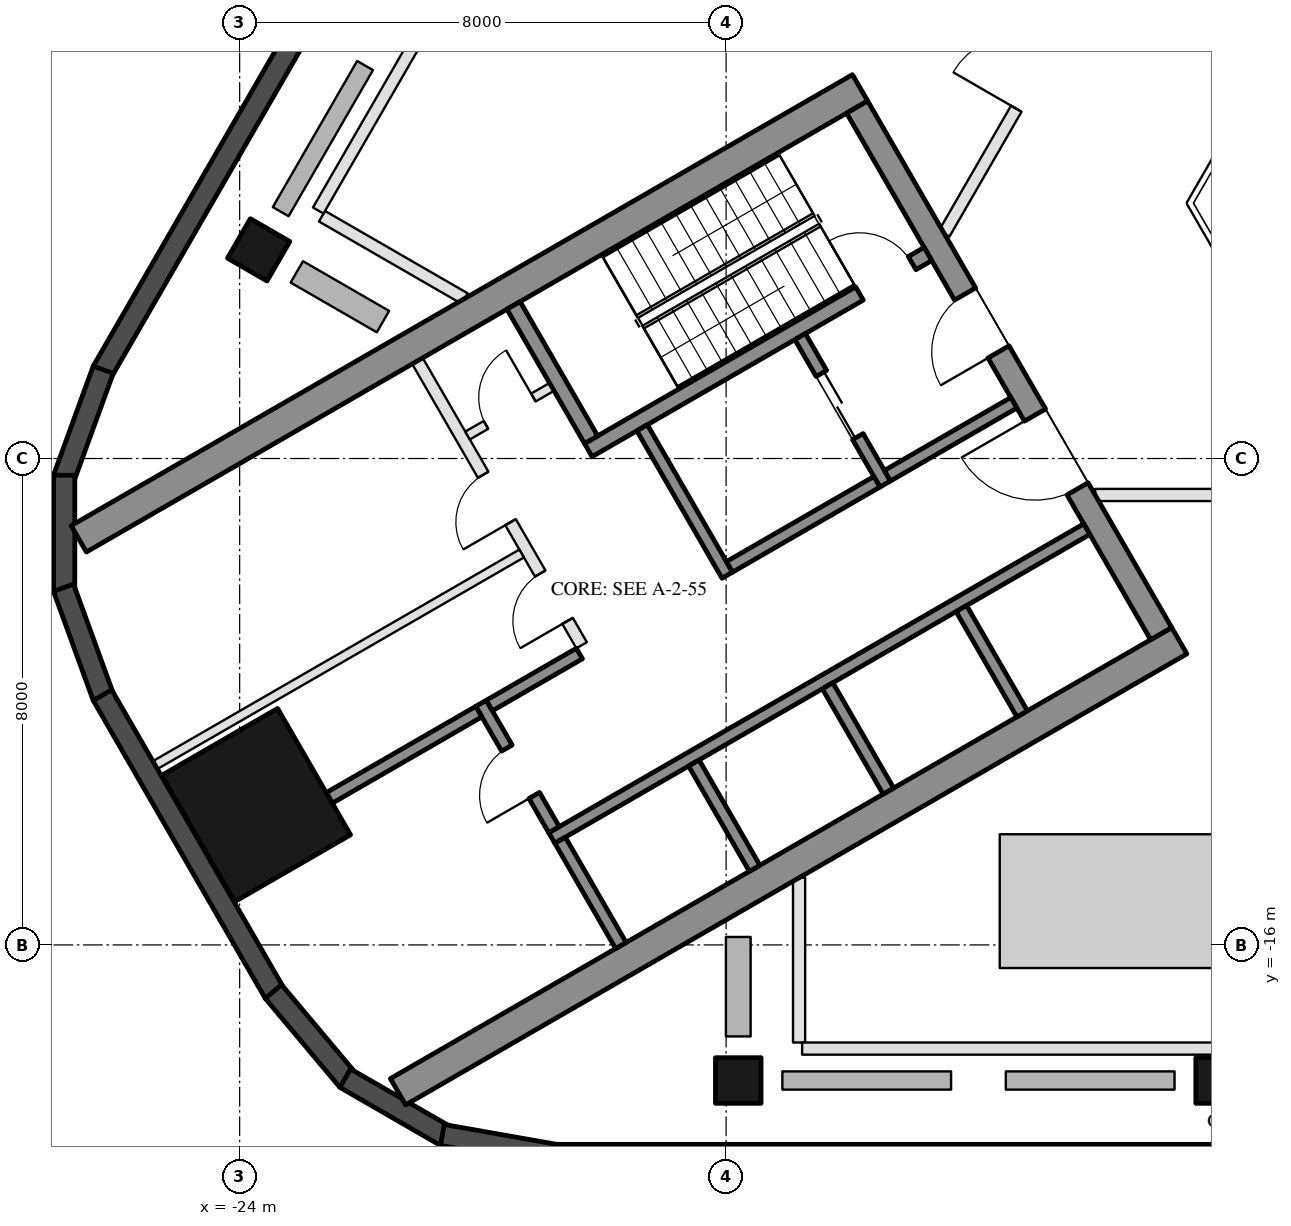
"""IFC4 building model, lengths in metres.
Left out: names, types, materials, properties, quantities, classifications, styles, units other than length and angle.
Written with IfcOpenShell. Run it as: python <this file> out.ifc"""

import sys

from ifc_helpers import new_model, si_unit, direction, frame, frame_2d, origin, origin_2d, place, context, subcontext, project, spatial, rectangle, hollow_rectangle, extrude, element, fill, save


model = new_model("IFC4")
c1 = context("Model", 3, precision=1e-05, world=origin(), true_north=direction((0.0, 1.0)))
c2 = subcontext(c1, "Body", "Model", "MODEL_VIEW")
j1 = project(units=[si_unit("LENGTHUNIT", "METRE"), si_unit("PLANEANGLEUNIT", "RADIAN")], contexts=[c1])
p1 = place(None, origin())
s1 = spatial("IfcSite", under=j1, at=p1, CompositionType="ELEMENT")
p2 = place(p1, origin())
s2 = spatial("IfcBuilding", under=s1, at=p2, CompositionType="ELEMENT")
p3 = place(p2, frame((0.0, 0.0, 237.7)))
s3 = spatial("IfcBuildingStorey", under=s2, at=p3, CompositionType="ELEMENT", Elevation=237.7)
for number, where, z_axis, x_axis in (
    (1, (-15.8, -18.23, 0.0), (0.0, 0.0, 1.0), (-1.0, 0.0, 0.0)),
    (2, (-7.9, -18.23, 0.0), (0.0, 0.0, 1.0), (-1.0, 0.0, 0.0)),
    (3, (-23.688, -4.568, 0.0), (0.0, 0.0, 1.0), (0.5, 0.866, 0.0)),
):
    element("IfcColumn", number, at=place(p3, frame(where, z_axis=z_axis, x_axis=x_axis)), inside=s3, PredefinedType="COLUMN", context=c2, shape_type="SweptSolid", body=[
        extrude(hollow_rectangle(XDim=0.75, YDim=0.75, WallThickness=0.035, at=origin_2d()), origin(), (0.0, 0.0, 1.0), 4.5),
    ])
p4 = place(p3, frame((-23.729, -13.7, 0.0), z_axis=(0.0, 0.0, 1.0), x_axis=(-0.5, 0.866025403784, 0.0)))
e4 = element("IfcColumn", 4, at=p4, inside=s3, PredefinedType="COLUMN", context=c2, shape_type="SweptSolid", body=[
    extrude(hollow_rectangle(XDim=2.4, YDim=2.2, WallThickness=0.06, at=origin_2d()), origin(), (0.0, 0.0, 1.0), 4.5),
])
p5 = place(p3, frame((-7.441, 26.022, 0.0), z_axis=(0.0, 0.0, 1.0), x_axis=(-0.499998380999, -0.866026338513, 0.0)))
e5 = element("IfcWall", 5, at=p5, inside=s3, PredefinedType="SOLIDWALL", context=c2, shape_type="SweptSolid", body=[
    extrude(rectangle(XDim=37.631, YDim=0.35, at=frame_2d((18.816, 0.0))), origin(), (0.0, 0.0, 1.0), 4.2),
])
for number, where, z_axis, x_axis in (
    (6, (-26.244, -6.54, 0.0), (0.0, 0.0, 1.0), (-0.342, -0.94, 0.0)),
    (7, (-26.886, -8.275, 0.0), (0.0, 0.0, 1.0), (0.0, -1.0, 0.0)),
    (8, (-26.897, -10.125, 0.0), (0.0, 0.0, 1.0), (0.342, -0.94, 0.0)),
):
    element("IfcWall", number, at=place(p3, frame(where, z_axis=z_axis, x_axis=x_axis)), inside=s3, PredefinedType="SOLIDWALL", context=c2, shape_type="SweptSolid", body=[
        extrude(rectangle(XDim=1.91, YDim=0.35, at=frame_2d((0.955, 0.0))), origin(), (0.0, 0.0, 1.0), 4.2),
    ])
p6 = place(p3, frame((-26.256, -11.893, 0.0), z_axis=(0.0, 0.0, 1.0), x_axis=(0.499986410639, -0.866033249463, 0.0)))
e9 = element("IfcWall", 9, at=p6, inside=s3, PredefinedType="SOLIDWALL", context=c2, shape_type="SweptSolid", body=[
    extrude(rectangle(XDim=5.658, YDim=0.35, at=frame_2d((2.829, 0.0))), origin(), (0.0, 0.0, 1.0), 4.2),
])
for number, where, z_axis, x_axis in (
    (10, (-23.445, -16.768, 0.0), (0.0, 0.0, 1.0), (0.643, -0.766, 0.0)),
    (11, (-22.264, -18.192, 0.0), (0.0, 0.0, 1.0), (0.866, -0.5, 0.0)),
):
    element("IfcWall", number, at=place(p3, frame(where, z_axis=z_axis, x_axis=x_axis)), inside=s3, PredefinedType="SOLIDWALL", context=c2, shape_type="SweptSolid", body=[
        extrude(rectangle(XDim=1.91, YDim=0.35, at=frame_2d((0.955, 0.0))), origin(), (0.0, 0.0, 1.0), 4.2),
    ])
p7 = place(p3, frame((-20.667, -19.126, 0.0), z_axis=(0.0, 0.0, 1.0), x_axis=(0.984798995425, -0.173697837091, 0.0)))
e12 = element("IfcWall", 12, at=p7, inside=s3, PredefinedType="SOLIDWALL", context=c2, shape_type="SweptSolid", body=[
    extrude(rectangle(XDim=1.91, YDim=0.35, at=frame_2d((0.955, 0.0))), origin(), (0.0, 0.0, 1.0), 4.2),
])
p8 = place(p3, frame((-18.816, -19.455, 0.0), z_axis=(0.0, 0.0, 1.0), x_axis=(1.0, 0.0, 0.0)))
e13 = element("IfcWall", 13, at=p8, inside=s3, PredefinedType="SOLIDWALL", context=c2, shape_type="SweptSolid", body=[
    extrude(rectangle(XDim=37.632, YDim=0.35, at=frame_2d((18.816, 0.0))), origin(), (0.0, 0.0, 1.0), 4.2),
])
for number, where, z_axis, x_axis in (
    (14, (-13.797, -1.903, 0.0), (0.0, 0.0, 1.0), (-0.866, -0.5, 0.0)),
    (15, (-8.547, -10.997, 0.0), (0.0, 0.0, 1.0), (-0.866, -0.5, 0.0)),
):
    element("IfcWall", number, at=place(p3, frame(where, z_axis=z_axis, x_axis=x_axis)), inside=s3, PredefinedType="SHEAR", context=c2, shape_type="SweptSolid", body=[
        extrude(rectangle(XDim=14.837, YDim=0.5, at=frame_2d((7.418, 0.0))), origin(), (0.0, 0.0, 1.0), 4.2),
    ])
p9 = place(p3, frame((-13.845, -2.22, 0.0), z_axis=(0.0, 0.0, 1.0), x_axis=(0.500004234368, -0.866022959057, 0.0)))
e16 = element("IfcWall", 16, at=p9, inside=s3, PredefinedType="SHEAR", context=c2, shape_type="SweptSolid", body=[
    extrude(rectangle(XDim=10.0, YDim=0.4, at=frame_2d((5.0, 0.0))), origin(), (0.0, 0.0, 1.0), 4.2),
])
p10 = place(p9, frame((3.55, 0.0, 0.0)))
e17 = element("IfcOpeningElement", 17, at=p10, cuts=e16, PredefinedType="OPENING", context=c2, shape_type="SweptSolid", body=[
    extrude(rectangle(XDim=1.1, YDim=2.1, at=frame_2d((0.55, 1.05))), frame((0.0, 0.21, 0.0), z_axis=(0.0, -1.0, 0.0), x_axis=(1.0, 0.0, 0.0)), (0.0, 0.0, 1.0), 0.42),
])
p11 = place(p9, frame((5.85, 0.0, 0.0)))
e18 = element("IfcOpeningElement", 18, at=p11, cuts=e16, PredefinedType="OPENING", context=c2, shape_type="SweptSolid", body=[
    extrude(rectangle(XDim=1.4, YDim=2.1, at=frame_2d((0.7, 1.05))), frame((0.0, 0.21, 0.0), z_axis=(0.0, -1.0, 0.0), x_axis=(1.0, 0.0, 0.0)), (0.0, 0.0, 1.0), 0.42),
])
p12 = place(p3, frame((-12.681, -4.636, 0.0), z_axis=(0.0, 0.0, 1.0), x_axis=(-0.866021702275, -0.500006411147, 0.0)))
e19 = element("IfcWall", 19, at=p12, inside=s3, PredefinedType="SHEAR", context=c2, shape_type="SweptSolid", body=[
    extrude(rectangle(XDim=6.45, YDim=0.25, at=frame_2d((3.225, 0.0))), origin(), (0.0, 0.0, 1.0), 4.2),
])
p13 = place(p12, frame((0.3, 0.0, 0.0)))
e20 = element("IfcOpeningElement", 20, at=p13, cuts=e19, PredefinedType="OPENING", context=c2, shape_type="SweptSolid", body=[
    extrude(rectangle(XDim=1.0, YDim=2.1, at=frame_2d((0.5, 1.05))), frame((0.0, 0.135, 0.0), z_axis=(0.0, -1.0, 0.0), x_axis=(1.0, 0.0, 0.0)), (0.0, 0.0, 1.0), 0.27),
])
p14 = place(p3, frame((-19.496, -5.482, 0.0), z_axis=(0.0, 0.0, 1.0), x_axis=(0.499990435942, -0.866030925526, 0.0)))
e21 = element("IfcWall", 21, at=p14, inside=s3, PredefinedType="SHEAR", context=c2, shape_type="SweptSolid", body=[
    extrude(rectangle(XDim=2.55, YDim=0.25, at=frame_2d((1.275, 0.0))), origin(), (0.0, 0.0, 1.0), 4.2),
])
p15 = place(p3, frame((-17.381, -7.495, 0.0), z_axis=(0.0, 0.0, 1.0), x_axis=(0.500011755427, -0.866018616679, 0.0)))
e22 = element("IfcWall", 22, at=p15, inside=s3, PredefinedType="SHEAR", context=c2, shape_type="SweptSolid", body=[
    extrude(rectangle(XDim=2.8, YDim=0.2, at=frame_2d((1.4, 0.0))), origin(), (0.0, 0.0, 1.0), 4.2),
])
p16 = place(p3, frame((-14.783, -5.995, 0.0), z_axis=(0.0, 0.0, 1.0), x_axis=(0.49994636267, -0.866056369097, 0.0)))
e23 = element("IfcWall", 23, at=p16, inside=s3, PredefinedType="SHEAR", context=c2, shape_type="SweptSolid", body=[
    extrude(rectangle(XDim=2.8, YDim=0.2, at=frame_2d((1.4, 0.0))), origin(), (0.0, 0.0, 1.0), 4.2),
])
p17 = place(p16, frame((0.7, 0.0, 0.0)))
e24 = element("IfcOpeningElement", 24, at=p17, cuts=e23, PredefinedType="OPENING", context=c2, shape_type="SweptSolid", body=[
    extrude(rectangle(XDim=1.2, YDim=2.1, at=frame_2d((0.6, 1.05))), frame((0.0, 0.11, 0.0), z_axis=(0.0, -1.0, 0.0), x_axis=(1.0, 0.0, 0.0)), (0.0, 0.0, 1.0), 0.22),
])
p18 = place(p3, frame((-13.52, -8.383, 0.0), z_axis=(0.0, 0.0, 1.0), x_axis=(-0.866034573852, -0.49998411664, 0.0)))
e25 = element("IfcWall", 25, at=p18, inside=s3, PredefinedType="SHEAR", context=c2, shape_type="SweptSolid", body=[
    extrude(rectangle(XDim=2.8, YDim=0.2, at=frame_2d((1.4, 0.0))), origin(), (0.0, 0.0, 1.0), 4.2),
])
p19 = place(p3, frame((-11.268, -7.083, 0.0), z_axis=(0.0, 0.0, 1.0), x_axis=(-0.866050077142, -0.499957262057, 0.0)))
e26 = element("IfcWall", 26, at=p19, inside=s3, PredefinedType="SHEAR", context=c2, shape_type="SweptSolid", body=[
    extrude(rectangle(XDim=2.4, YDim=0.2, at=frame_2d((1.2, 0.0))), origin(), (0.0, 0.0, 1.0), 4.2),
])
p20 = place(p3, frame((-10.068, -9.162, 0.0), z_axis=(0.0, 0.0, 1.0), x_axis=(-0.866032725843, -0.499987317609, 0.0)))
e27 = element("IfcWall", 27, at=p20, inside=s3, PredefinedType="SHEAR", context=c2, shape_type="SweptSolid", body=[
    extrude(rectangle(XDim=10.16, YDim=0.2, at=frame_2d((5.08, 0.0))), origin(), (0.0, 0.0, 1.0), 4.2),
])
p21 = place(p3, frame((-20.031, -12.026, 0.0), z_axis=(0.0, 0.0, 1.0), x_axis=(0.500033551112, -0.866006032174, 0.0)))
e28 = element("IfcWall", 28, at=p21, inside=s3, PredefinedType="SHEAR", context=c2, shape_type="SweptSolid", body=[
    extrude(rectangle(XDim=2.4, YDim=0.2, at=frame_2d((1.2, 0.0))), origin(), (0.0, 0.0, 1.0), 4.2),
])
p22 = place(p21, frame((0.85, 0.0, 0.0)))
e29 = element("IfcOpeningElement", 29, at=p22, cuts=e28, PredefinedType="OPENING", context=c2, shape_type="SweptSolid", body=[
    extrude(rectangle(XDim=0.9, YDim=2.1, at=frame_2d((0.45, 1.05))), frame((0.0, 0.11, 0.0), z_axis=(0.0, -1.0, 0.0), x_axis=(1.0, 0.0, 0.0)), (0.0, 0.0, 1.0), 0.22),
])
p23 = place(p3, frame((-18.413, -11.208, 0.0), z_axis=(0.0, 0.0, 1.0), x_axis=(-0.866038183914, -0.499977863513, 0.0)))
e30 = element("IfcWall", 30, at=p23, inside=s3, PredefinedType="SHEAR", context=c2, shape_type="SweptSolid", body=[
    extrude(rectangle(XDim=1.71, YDim=0.2, at=frame_2d((0.855, 0.0))), origin(), (0.0, 0.0, 1.0), 4.2),
])
for number, where, z_axis, x_axis in (
    (31, (-12.131, -10.468, 0.0), (0.0, 0.0, 1.0), (0.5, -0.866, 0.0)),
    (32, (-14.331, -11.738, 0.0), (0.0, 0.0, 1.0), (0.5, -0.866, 0.0)),
    (33, (-16.531, -13.008, 0.0), (0.0, 0.0, 1.0), (0.5, -0.866, 0.0)),
    (34, (-18.73, -14.278, 0.0), (0.0, 0.0, 1.0), (0.5, -0.866, 0.0)),
):
    element("IfcWall", number, at=place(p3, frame(where, z_axis=z_axis, x_axis=x_axis)), inside=s3, PredefinedType="SHEAR", context=c2, shape_type="SweptSolid", body=[
        extrude(rectangle(XDim=2.0, YDim=0.2, at=frame_2d((1.0, 0.0))), origin(), (0.0, 0.0, 1.0), 4.2),
    ])
p24 = place(p3, frame((-20.067, -12.163, 0.0), z_axis=(0.0, 0.0, 1.0), x_axis=(-0.866055327414, -0.49994816717, 0.0)))
e35 = element("IfcWall", 35, at=p24, inside=s3, PredefinedType="SHEAR", context=c2, shape_type="SweptSolid", body=[
    extrude(rectangle(XDim=2.84, YDim=0.2, at=frame_2d((1.42, 0.0))), origin(), (0.0, 0.0, 1.0), 4.2),
])
p25 = place(p3, frame((-21.076, -6.395, 0.0), z_axis=(0.0, 0.0, 1.0), x_axis=(0.50001468107, -0.866016927499, 0.0)))
e36 = element("IfcWall", 36, at=p25, inside=s3, PredefinedType="PARTITIONING", context=c2, shape_type="SweptSolid", body=[
    extrude(rectangle(XDim=5.4, YDim=0.2, at=frame_2d((2.7, 0.0))), origin(), (0.0, 0.0, 1.0), 4.2),
])
p26 = place(p25, frame((2.163, 0.0, 0.0)))
e37 = element("IfcOpeningElement", 37, at=p26, cuts=e36, PredefinedType="OPENING", context=c2, shape_type="SweptSolid", body=[
    extrude(rectangle(XDim=0.9, YDim=2.1, at=frame_2d((0.45, 1.05))), frame((0.0, 0.11, 0.0), z_axis=(0.0, -1.0, 0.0), x_axis=(1.0, 0.0, 0.0)), (0.0, 0.0, 1.0), 0.22),
])
p27 = place(p25, frame((4.038, 0.0, 0.0)))
e38 = element("IfcOpeningElement", 38, at=p27, cuts=e36, PredefinedType="OPENING", context=c2, shape_type="SweptSolid", body=[
    extrude(rectangle(XDim=0.9, YDim=2.1, at=frame_2d((0.45, 1.05))), frame((0.0, 0.11, 0.0), z_axis=(0.0, -1.0, 0.0), x_axis=(1.0, 0.0, 0.0)), (0.0, 0.0, 1.0), 0.22),
])
p28 = place(p3, frame((-18.866, -6.822, 0.0), z_axis=(0.0, 0.0, 1.0), x_axis=(-0.866028054938, -0.499995408039, 0.0)))
e39 = element("IfcWall", 39, at=p28, inside=s3, PredefinedType="PARTITIONING", context=c2, shape_type="SweptSolid", body=[
    extrude(rectangle(XDim=1.6, YDim=0.15, at=frame_2d((0.8, 0.0))), origin(), (0.0, 0.0, 1.0), 4.2),
])
p29 = place(p28, frame((0.35, 0.0, 0.0)))
e40 = element("IfcOpeningElement", 40, at=p29, cuts=e39, PredefinedType="OPENING", context=c2, shape_type="SweptSolid", body=[
    extrude(rectangle(XDim=0.9, YDim=2.1, at=frame_2d((0.45, 1.05))), frame((0.0, 0.085, 0.0), z_axis=(0.0, -1.0, 0.0), x_axis=(1.0, 0.0, 0.0)), (0.0, 0.0, 1.0), 0.17),
])
p30 = place(p3, frame((-19.363, -9.562, 0.0), z_axis=(0.0, 0.0, 1.0), x_axis=(-0.866016523273, -0.500015381182, 0.0)))
e41 = element("IfcWall", 41, at=p30, inside=s3, PredefinedType="PARTITIONING", context=c2, shape_type="SweptSolid", body=[
    extrude(rectangle(XDim=6.95, YDim=0.15, at=frame_2d((3.475, 0.0))), origin(), (0.0, 0.0, 1.0), 4.2),
])
p31 = place(p3, frame((-14.8, -17.605, 0.0), z_axis=(0.0, 0.0, 1.0), x_axis=(0.0, 1.0, 0.0)))
e42 = element("IfcWall", 42, at=p31, inside=s3, PredefinedType="PARTITIONING", context=c2, shape_type="SweptSolid", body=[
    extrude(rectangle(XDim=2.709, YDim=0.2, at=frame_2d((1.355, 0.0))), origin(), (0.0, 0.0, 1.0), 4.2),
])
p32 = place(p3, frame((-14.75, -17.705, 0.0), z_axis=(0.0, 0.0, 1.0), x_axis=(1.0, 0.0, 0.0)))
e43 = element("IfcWall", 43, at=p32, inside=s3, PredefinedType="PARTITIONING", context=c2, shape_type="SweptSolid", body=[
    extrude(rectangle(XDim=29.5, YDim=0.2, at=frame_2d((14.75, 0.0))), origin(), (0.0, 0.0, 1.0), 3.41),
])
p33 = place(p3, frame((-9.93, -8.6, 0.0), z_axis=(0.0, 0.0, 1.0), x_axis=(1.0, 0.0, 0.0)))
e44 = element("IfcWall", 44, at=p33, inside=s3, PredefinedType="PARTITIONING", context=c2, shape_type="SweptSolid", body=[
    extrude(rectangle(XDim=19.861, YDim=0.2, at=frame_2d((9.93, 0.0))), origin(), (0.0, 0.0, 1.0), 3.41),
])
p34 = place(p33, frame((6.121, 0.0, 0.0)))
e45 = element("IfcOpeningElement", 45, at=p34, cuts=e44, PredefinedType="OPENING", context=c2, shape_type="SweptSolid", body=[
    extrude(rectangle(XDim=1.2, YDim=2.1, at=frame_2d((0.6, 1.05))), frame((0.0, 0.11, 0.0), z_axis=(0.0, -1.0, 0.0), x_axis=(1.0, 0.0, 0.0)), (0.0, 0.0, 1.0), 0.22),
])
p35 = place(p33, frame((16.04, 0.0, 0.0)))
e46 = element("IfcOpeningElement", 46, at=p35, cuts=e44, PredefinedType="OPENING", context=c2, shape_type="SweptSolid", body=[
    extrude(rectangle(XDim=1.2, YDim=2.1, at=frame_2d((0.6, 1.05))), frame((0.0, 0.11, 0.0), z_axis=(0.0, -1.0, 0.0), x_axis=(1.0, 0.0, 0.0)), (0.0, 0.0, 1.0), 0.22),
])
p36 = place(p3, frame((-22.646, -4.015, 0.0), z_axis=(0.0, 0.0, 1.0), x_axis=(0.866044551023, -0.499966834543, 0.0)))
e47 = element("IfcWall", 47, at=p36, inside=s3, PredefinedType="PARTITIONING", context=c2, shape_type="SweptSolid", body=[
    extrude(rectangle(XDim=2.71, YDim=0.2, at=frame_2d((1.355, 0.0))), origin(), (0.0, 0.0, 1.0), 4.2),
])
p37 = place(p3, frame((-7.958, 21.626, 0.0), z_axis=(0.0, 0.0, 1.0), x_axis=(-0.499998500593, -0.866026269466, 0.0)))
e48 = element("IfcWall", 48, at=p37, inside=s3, PredefinedType="PARTITIONING", context=c2, shape_type="SweptSolid", body=[
    extrude(rectangle(XDim=29.5, YDim=0.2, at=frame_2d((14.75, 0.0))), origin(), (0.0, 0.0, 1.0), 3.41),
])
p38 = place(p3, frame((-2.482, 12.9, 0.0), z_axis=(0.0, 0.0, 1.0), x_axis=(-0.50000478328, -0.866022642139, 0.0)))
e49 = element("IfcWall", 49, at=p38, inside=s3, PredefinedType="PARTITIONING", context=c2, shape_type="SweptSolid", body=[
    extrude(rectangle(XDim=19.861, YDim=0.2, at=frame_2d((9.931, 0.0))), origin(), (0.0, 0.0, 1.0), 3.41),
])
p39 = place(p38, frame((3.371, 0.0, 0.0)))
e50 = element("IfcOpeningElement", 50, at=p39, cuts=e49, PredefinedType="OPENING", context=c2, shape_type="SweptSolid", body=[
    extrude(rectangle(XDim=1.2, YDim=2.1, at=frame_2d((0.6, 1.05))), frame((0.0, 0.11, 0.0), z_axis=(0.0, -1.0, 0.0), x_axis=(1.0, 0.0, 0.0)), (0.0, 0.0, 1.0), 0.22),
])
p40 = place(p38, frame((10.331, 0.0, 0.0)))
e51 = element("IfcOpeningElement", 51, at=p40, cuts=e49, PredefinedType="OPENING", context=c2, shape_type="SweptSolid", body=[
    extrude(rectangle(XDim=1.2, YDim=2.1, at=frame_2d((0.6, 1.05))), frame((0.0, 0.11, 0.0), z_axis=(0.0, -1.0, 0.0), x_axis=(1.0, 0.0, 0.0)), (0.0, 0.0, 1.0), 0.22),
])
p41 = place(p38, frame((16.29, 0.0, 0.0)))
e52 = element("IfcOpeningElement", 52, at=p41, cuts=e49, PredefinedType="OPENING", context=c2, shape_type="SweptSolid", body=[
    extrude(rectangle(XDim=1.2, YDim=2.1, at=frame_2d((0.6, 1.05))), frame((0.0, 0.11, 0.0), z_axis=(0.0, -1.0, 0.0), x_axis=(1.0, 0.0, 0.0)), (0.0, 0.0, 1.0), 0.22),
])
p42 = place(p17, origin())
e53 = element("IfcDoor", 53, at=p42, inside=s3, OperationType="DOUBLE_DOOR_SLIDING", PredefinedType="DOOR", context=c2, shape_type="SweptSolid", body=[
    extrude(rectangle(XDim=1.2, YDim=2.1, at=frame_2d((0.6, 1.05))), frame((0.0, 0.025, 0.0), z_axis=(0.0, -1.0, 0.0), x_axis=(1.0, 0.0, 0.0)), (0.0, 0.0, 1.0), 0.05),
])
fill(e24, e53)
p43 = place(p29, frame((0.9, 0.0, 0.0), z_axis=(0.0, 0.0, 1.0), x_axis=(-1.0, 0.0, 0.0)))
e54 = element("IfcDoor", 54, at=p43, inside=s3, OperationType="SINGLE_SWING_RIGHT", PredefinedType="DOOR", context=c2, shape_type="SweptSolid", body=[
    extrude(rectangle(XDim=0.9, YDim=2.1, at=frame_2d((0.45, 1.05))), frame((0.0, 0.025, 0.0), z_axis=(0.0, -1.0, 0.0), x_axis=(1.0, 0.0, 0.0)), (0.0, 0.0, 1.0), 0.05),
])
fill(e40, e54)
p44 = place(p22, frame((0.9, 0.0, 0.0), z_axis=(0.0, 0.0, 1.0), x_axis=(-1.0, 0.0, 0.0)))
e55 = element("IfcDoor", 55, at=p44, inside=s3, OperationType="SINGLE_SWING_LEFT", PredefinedType="DOOR", context=c2, shape_type="SweptSolid", body=[
    extrude(rectangle(XDim=0.9, YDim=2.1, at=frame_2d((0.45, 1.05))), frame((0.0, 0.025, 0.0), z_axis=(0.0, -1.0, 0.0), x_axis=(1.0, 0.0, 0.0)), (0.0, 0.0, 1.0), 0.05),
])
fill(e29, e55)
p45 = place(p26, frame((0.9, 0.0, 0.0), z_axis=(0.0, 0.0, 1.0), x_axis=(-1.0, 0.0, 0.0)))
e56 = element("IfcDoor", 56, at=p45, inside=s3, OperationType="SINGLE_SWING_LEFT", PredefinedType="DOOR", context=c2, shape_type="SweptSolid", body=[
    extrude(rectangle(XDim=0.9, YDim=2.1, at=frame_2d((0.45, 1.05))), frame((0.0, 0.025, 0.0), z_axis=(0.0, -1.0, 0.0), x_axis=(1.0, 0.0, 0.0)), (0.0, 0.0, 1.0), 0.05),
])
fill(e37, e56)
p46 = place(p27, frame((0.9, 0.0, 0.0), z_axis=(0.0, 0.0, 1.0), x_axis=(-1.0, 0.0, 0.0)))
e57 = element("IfcDoor", 57, at=p46, inside=s3, OperationType="SINGLE_SWING_LEFT", PredefinedType="DOOR", context=c2, shape_type="SweptSolid", body=[
    extrude(rectangle(XDim=0.9, YDim=2.1, at=frame_2d((0.45, 1.05))), frame((0.0, 0.025, 0.0), z_axis=(0.0, -1.0, 0.0), x_axis=(1.0, 0.0, 0.0)), (0.0, 0.0, 1.0), 0.05),
])
fill(e38, e57)
p47 = place(p10, frame((1.1, 0.0, 0.0), z_axis=(0.0, 0.0, 1.0), x_axis=(-1.0, 0.0, 0.0)))
e58 = element("IfcDoor", 58, at=p47, inside=s3, OperationType="SINGLE_SWING_LEFT", PredefinedType="DOOR", context=c2, shape_type="SweptSolid", body=[
    extrude(rectangle(XDim=1.1, YDim=2.1, at=frame_2d((0.55, 1.05))), frame((0.0, 0.025, 0.0), z_axis=(0.0, -1.0, 0.0), x_axis=(1.0, 0.0, 0.0)), (0.0, 0.0, 1.0), 0.05),
])
fill(e17, e58)
p48 = place(p11, frame((1.4, 0.0, 0.0), z_axis=(0.0, 0.0, 1.0), x_axis=(-1.0, 0.0, 0.0)))
e59 = element("IfcDoor", 59, at=p48, inside=s3, OperationType="DOUBLE_DOOR_SINGLE_SWING", PredefinedType="DOOR", context=c2, shape_type="SweptSolid", body=[
    extrude(rectangle(XDim=1.4, YDim=2.1, at=frame_2d((0.7, 1.05))), frame((0.0, 0.025, 0.0), z_axis=(0.0, -1.0, 0.0), x_axis=(1.0, 0.0, 0.0)), (0.0, 0.0, 1.0), 0.05),
])
fill(e18, e59)
p49 = place(p13, frame((1.0, 0.0, 0.0), z_axis=(0.0, 0.0, 1.0), x_axis=(-1.0, 0.0, 0.0)))
e60 = element("IfcDoor", 60, at=p49, inside=s3, OperationType="SINGLE_SWING_LEFT", PredefinedType="DOOR", context=c2, shape_type="SweptSolid", body=[
    extrude(rectangle(XDim=1.0, YDim=2.1, at=frame_2d((0.5, 1.05))), frame((0.0, 0.025, 0.0), z_axis=(0.0, -1.0, 0.0), x_axis=(1.0, 0.0, 0.0)), (0.0, 0.0, 1.0), 0.05),
])
fill(e20, e60)
p50 = place(p41, frame((1.2, 0.0, 0.0), z_axis=(0.0, 0.0, 1.0), x_axis=(-1.0, 0.0, 0.0)))
e61 = element("IfcDoor", 61, at=p50, inside=s3, OperationType="SINGLE_SWING_LEFT", PredefinedType="DOOR", context=c2, shape_type="SweptSolid", body=[
    extrude(rectangle(XDim=1.2, YDim=2.1, at=frame_2d((0.6, 1.05))), frame((0.0, 0.025, 0.0), z_axis=(0.0, -1.0, 0.0), x_axis=(1.0, 0.0, 0.0)), (0.0, 0.0, 1.0), 0.05),
])
fill(e52, e61)
save(model, sys.argv[1])
